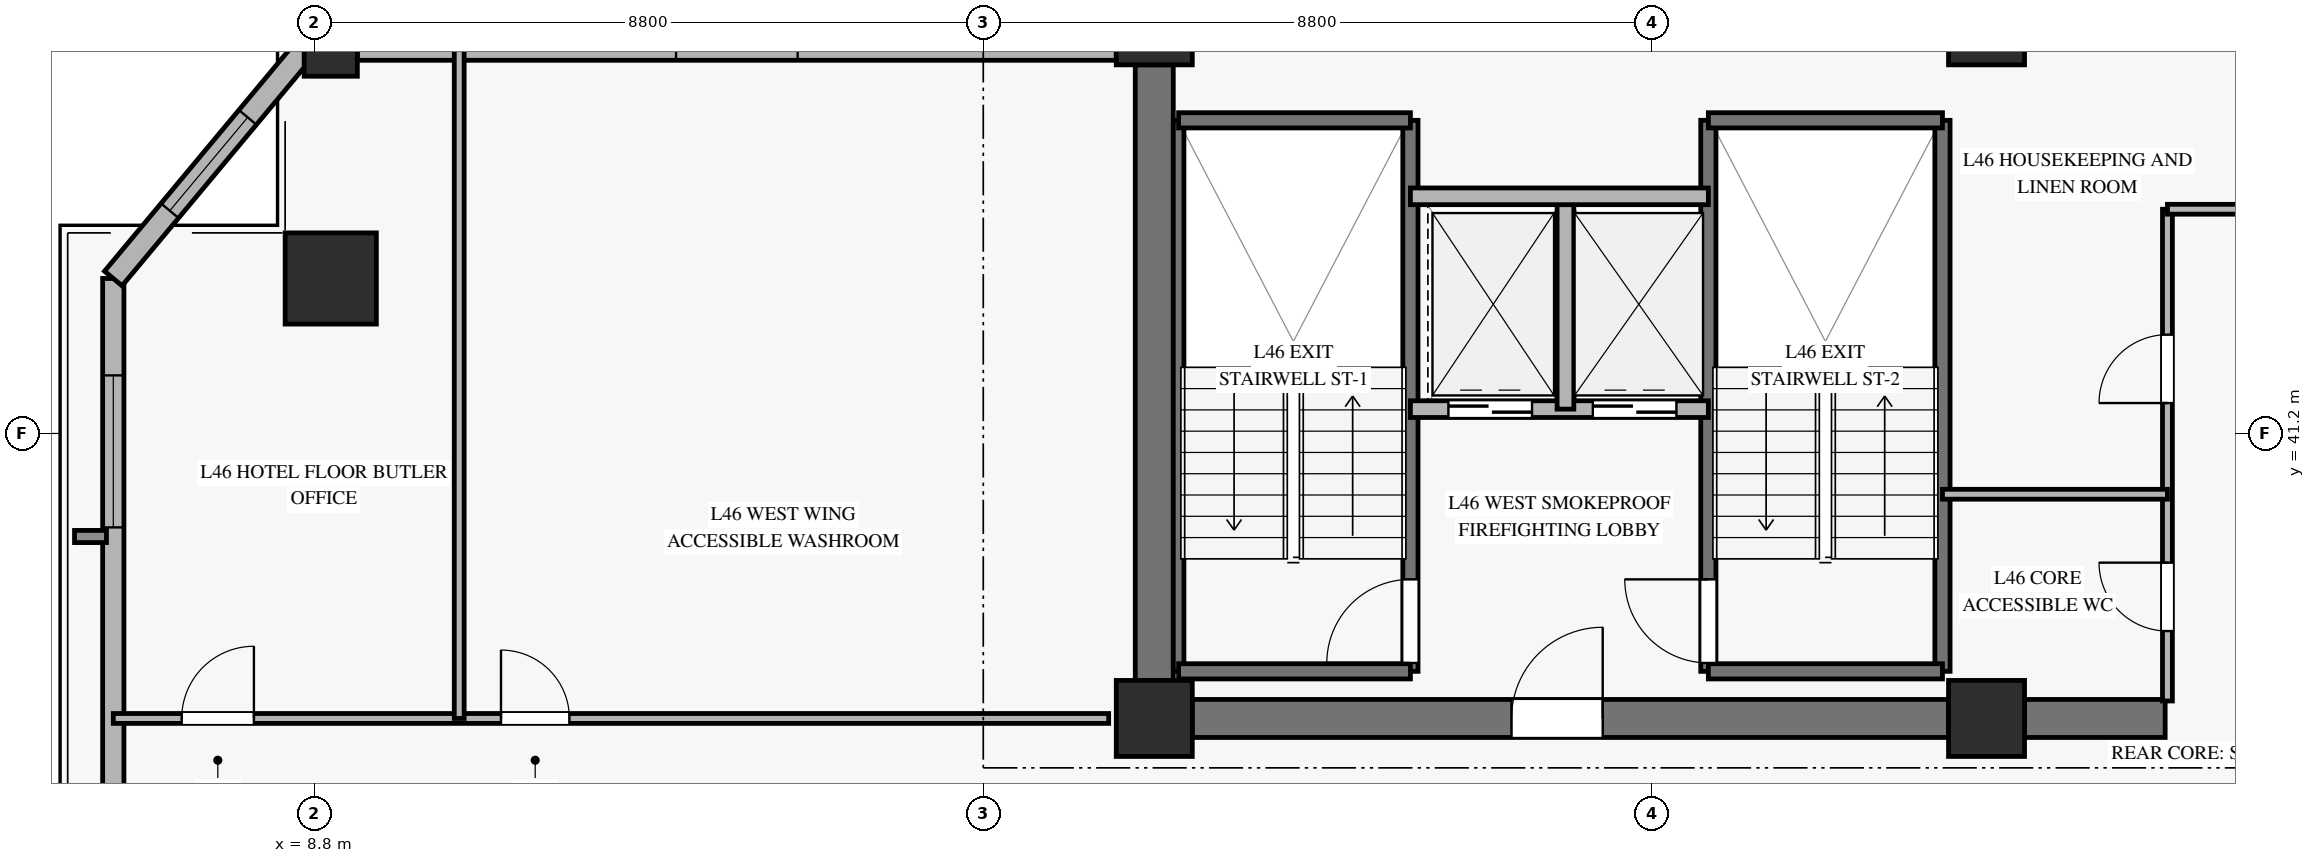
"""IFC4 building model, lengths in metres.
Left out: names, types, materials, properties, quantities, classifications, styles, units other than length and angle.
Written with IfcOpenShell. Run it as: python <this file> out.ifc"""

import sys

from ifc_helpers import new_model, si_unit, direction, frame, frame_2d, origin, origin_2d, place, context, subcontext, project, spatial, rectangle, hollow_rectangle, extrude, source, transform, mapped, element, fill, save


model = new_model("IFC4")
c1 = context("Model", 3, precision=1e-05, world=origin(), true_north=direction((0.0, 1.0)))
c2 = subcontext(c1, "Body", "Model", "MODEL_VIEW")
j1 = project(units=[si_unit("LENGTHUNIT", "METRE"), si_unit("PLANEANGLEUNIT", "RADIAN")], contexts=[c1])
p1 = place(None, origin())
s1 = spatial("IfcSite", under=j1, at=p1, CompositionType="ELEMENT")
p2 = place(p1, origin())
s2 = spatial("IfcBuilding", under=s1, at=p2, CompositionType="ELEMENT")
p3 = place(p2, frame((0.0, 0.0, 184.2)))
s3 = spatial("IfcBuildingStorey", under=s2, at=p3, CompositionType="ELEMENT", Elevation=184.2)
m1 = source(origin(), c2, "Body", "SweptSolid", [
    extrude(rectangle(XDim=1.0, YDim=1.0, at=origin_2d()), origin(), (0.0, 0.0, 1.0), 3.27),
])
for number, where, z_axis, x_axis in (
    (1, (19.85, 37.45, 0.0), (0.0, 0.0, 1.0), (1.0, 0.0, 0.0)),
    (2, (19.85, 46.55, 0.0), (0.0, 0.0, 1.0), (1.0, 0.0, 0.0)),
    (3, (30.8, 37.45, 0.0), (0.0, 0.0, 1.0), (1.0, 0.0, 0.0)),
    (4, (30.8, 46.55, 0.0), (0.0, 0.0, 1.0), (1.0, 0.0, 0.0)),
):
    element("IfcColumn", number, at=place(p3, frame(where, z_axis=z_axis, x_axis=x_axis)), inside=s3, PredefinedType="PILASTER", context=c2, shape_type="MappedRepresentation", body=[
        mapped(m1, transform((0.0, 0.0, 0.0), x_axis=(1.0, 0.0, 0.0), y_axis=(0.0, 1.0, 0.0), z_axis=(0.0, 0.0, 1.0), scale=1.0)),
    ])
p4 = place(p3, frame((20.35, 37.45, 0.0), z_axis=(0.0, 0.0, 1.0), x_axis=(1.0, 0.0, 0.0)))
e5 = element("IfcWall", 5, at=p4, inside=s3, PredefinedType="SHEAR", context=c2, shape_type="SweptSolid", body=[
    extrude(rectangle(XDim=9.95, YDim=0.5, at=frame_2d((4.975, 0.0))), origin(), (0.0, 0.0, 1.0), 3.27),
])
p5 = place(p4, frame((4.2, 0.0, 0.0)))
e6 = element("IfcOpeningElement", 6, at=p5, cuts=e5, PredefinedType="OPENING", context=c2, shape_type="SweptSolid", body=[
    extrude(rectangle(XDim=1.2, YDim=2.15, at=frame_2d((0.6, 1.075))), frame((0.0, 0.26, 0.0), z_axis=(0.0, -1.0, 0.0), x_axis=(1.0, 0.0, 0.0)), (0.0, 0.0, 1.0), 0.52),
])
p6 = place(p3, frame((31.3, 37.45, 0.0), z_axis=(0.0, 0.0, 1.0), x_axis=(1.0, 0.0, 0.0)))
e7 = element("IfcWall", 7, at=p6, inside=s3, PredefinedType="SHEAR", context=c2, shape_type="SweptSolid", body=[
    extrude(rectangle(XDim=1.85, YDim=0.5, at=frame_2d((0.925, 0.0))), origin(), (0.0, 0.0, 1.0), 3.27),
])
p7 = place(p3, frame((19.85, 37.95, 0.0), z_axis=(0.0, 0.0, 1.0), x_axis=(0.0, 1.0, 0.0)))
e8 = element("IfcWall", 8, at=p7, inside=s3, PredefinedType="SHEAR", context=c2, shape_type="SweptSolid", body=[
    extrude(rectangle(XDim=8.1, YDim=0.5, at=frame_2d((4.05, 0.0))), origin(), (0.0, 0.0, 1.0), 3.27),
])
m2 = source(origin(), c2, "Body", "SweptSolid", [
    extrude(hollow_rectangle(XDim=1.2, YDim=1.2, WallThickness=0.055, at=origin_2d()), origin(), (0.0, 0.0, 1.0), 3.27),
])
p8 = place(p3, frame((9.015, 43.239, 0.0), z_axis=(0.0, 0.0, 1.0), x_axis=(1.0, 0.0, 0.0)))
e9 = element("IfcColumn", 9, at=p8, inside=s3, PredefinedType="COLUMN", context=c2, shape_type="MappedRepresentation", body=[
    mapped(m2, transform((0.0, 0.0, 0.0), x_axis=(1.0, 0.0, 0.0), y_axis=(0.0, 1.0, 0.0), z_axis=(0.0, 0.0, 1.0), scale=1.0)),
])
m3 = source(origin(), c2, "Body", "SweptSolid", [
    extrude(hollow_rectangle(XDim=0.7, YDim=0.7, WallThickness=0.032, at=origin_2d()), origin(), (0.0, 0.0, 1.0), 3.27),
])
p9 = place(p3, frame((9.015, 46.25, 0.0), z_axis=(0.0, 0.0, 1.0), x_axis=(1.0, 0.0, 0.0)))
e10 = element("IfcColumn", 10, at=p9, inside=s3, PredefinedType="COLUMN", context=c2, shape_type="MappedRepresentation", body=[
    mapped(m3, transform((0.0, 0.0, 0.0), x_axis=(1.0, 0.0, 0.0), y_axis=(0.0, 1.0, 0.0), z_axis=(0.0, 0.0, 1.0), scale=1.0)),
])
p10 = place(p3, frame((6.154, 28.477, 0.0), z_axis=(0.0, 0.0, 1.0), x_axis=(0.0, 1.0, 0.0)))
e11 = element("IfcWall", 11, at=p10, inside=s3, PredefinedType="SOLIDWALL", context=c2, shape_type="SweptSolid", body=[
    extrude(rectangle(XDim=14.762, YDim=0.28, at=frame_2d((7.381, 0.0))), origin(), (0.0, 0.0, 1.0), 2.75),
])
p11 = place(p10, frame((1.232, 0.0, 0.45)))
e12 = element("IfcOpeningElement", 12, at=p11, cuts=e11, PredefinedType="OPENING", context=c2, shape_type="SweptSolid", body=[
    extrude(rectangle(XDim=2.0, YDim=2.0, at=frame_2d((1.0, 1.0))), frame((0.0, 0.15, 0.0), z_axis=(0.0, -1.0, 0.0), x_axis=(1.0, 0.0, 0.0)), (0.0, 0.0, 1.0), 0.3),
])
p12 = place(p10, frame((11.487, 0.0, 0.45)))
e13 = element("IfcOpeningElement", 13, at=p12, cuts=e11, PredefinedType="OPENING", context=c2, shape_type="SweptSolid", body=[
    extrude(rectangle(XDim=2.0, YDim=2.0, at=frame_2d((1.0, 1.0))), frame((0.0, 0.15, 0.0), z_axis=(0.0, -1.0, 0.0), x_axis=(1.0, 0.0, 0.0)), (0.0, 0.0, 1.0), 0.3),
])
p13 = place(p3, frame((9.365, 46.25, 0.0), z_axis=(0.0, 0.0, 1.0), x_axis=(1.0, 0.0, 0.0)))
e14 = element("IfcWall", 14, at=p13, inside=s3, PredefinedType="SOLIDWALL", context=c2, shape_type="SweptSolid", body=[
    extrude(rectangle(XDim=9.985, YDim=0.28, at=frame_2d((4.993, 0.0))), origin(), (0.0, 0.0, 1.0), 2.75),
])
p14 = place(p13, frame((4.193, 0.0, 0.45)))
e15 = element("IfcOpeningElement", 15, at=p14, cuts=e14, PredefinedType="OPENING", context=c2, shape_type="SweptSolid", body=[
    extrude(rectangle(XDim=1.6, YDim=2.0, at=frame_2d((0.8, 1.0))), frame((0.0, 0.15, 0.0), z_axis=(0.0, -1.0, 0.0), x_axis=(1.0, 0.0, 0.0)), (0.0, 0.0, 1.0), 0.3),
])
p15 = place(p3, frame((8.665, 46.25, 0.0), z_axis=(0.0, 0.0, 1.0), x_axis=(-0.640459985381, -0.767991541051, 0.0)))
e16 = element("IfcWall", 16, at=p15, inside=s3, PredefinedType="SOLIDWALL", context=c2, shape_type="SweptSolid", body=[
    extrude(rectangle(XDim=3.921, YDim=0.3, at=frame_2d((1.96, 0.0))), origin(), (0.0, 0.0, 1.0), 2.75),
])
p16 = place(p15, frame((1.16, 0.0, 0.45)))
e17 = element("IfcOpeningElement", 17, at=p16, cuts=e16, PredefinedType="OPENING", context=c2, shape_type="SweptSolid", body=[
    extrude(rectangle(XDim=1.6, YDim=2.0, at=frame_2d((0.8, 1.0))), frame((0.0, 0.16, 0.0), z_axis=(0.0, -1.0, 0.0), x_axis=(1.0, 0.0, 0.0)), (0.0, 0.0, 1.0), 0.32),
])
p17 = place(p3, frame((20.17, 38.07, 0.0), z_axis=(0.0, 0.0, 1.0), x_axis=(0.0, 1.0, 0.0)))
e18 = element("IfcWall", 18, at=p17, inside=s3, PredefinedType="SOLIDWALL", context=c2, shape_type="SweptSolid", body=[
    extrude(rectangle(XDim=7.25, YDim=0.14, at=frame_2d((3.625, 0.0))), origin(), (0.0, 0.0, 1.0), 3.5),
])
p18 = place(p3, frame((23.22, 38.07, 0.0), z_axis=(0.0, 0.0, 1.0), x_axis=(0.0, 1.0, 0.0)))
e19 = element("IfcWall", 19, at=p18, inside=s3, PredefinedType="SOLIDWALL", context=c2, shape_type="SweptSolid", body=[
    extrude(rectangle(XDim=7.25, YDim=0.2, at=frame_2d((3.625, 0.0))), origin(), (0.0, 0.0, 1.0), 3.5),
])
p19 = place(p18, frame((0.11, 0.0, 0.0)))
e20 = element("IfcOpeningElement", 20, at=p19, cuts=e19, PredefinedType="OPENING", context=c2, shape_type="SweptSolid", body=[
    extrude(rectangle(XDim=1.1, YDim=2.15, at=frame_2d((0.55, 1.075))), frame((0.0, 0.11, 0.0), z_axis=(0.0, -1.0, 0.0), x_axis=(1.0, 0.0, 0.0)), (0.0, 0.0, 1.0), 0.22),
])
for number, where, z_axis, x_axis in (
    (21, (20.17, 45.32, 0.0), (0.0, 0.0, 1.0), (1.0, 0.0, 0.0)),
    (22, (20.17, 38.07, 0.0), (0.0, 0.0, 1.0), (1.0, 0.0, 0.0)),
):
    element("IfcWall", number, at=place(p3, frame(where, z_axis=z_axis, x_axis=x_axis)), inside=s3, PredefinedType="SOLIDWALL", context=c2, shape_type="SweptSolid", body=[
        extrude(rectangle(XDim=3.05, YDim=0.2, at=frame_2d((1.525, 0.0))), origin(), (0.0, 0.0, 1.0), 3.5),
    ])
p20 = place(p3, frame((27.14, 38.07, 0.0), z_axis=(0.0, 0.0, 1.0), x_axis=(0.0, 1.0, 0.0)))
e23 = element("IfcWall", 23, at=p20, inside=s3, PredefinedType="SOLIDWALL", context=c2, shape_type="SweptSolid", body=[
    extrude(rectangle(XDim=7.25, YDim=0.2, at=frame_2d((3.625, 0.0))), origin(), (0.0, 0.0, 1.0), 3.5),
])
p21 = place(p20, frame((0.11, 0.0, 0.0)))
e24 = element("IfcOpeningElement", 24, at=p21, cuts=e23, PredefinedType="OPENING", context=c2, shape_type="SweptSolid", body=[
    extrude(rectangle(XDim=1.1, YDim=2.15, at=frame_2d((0.55, 1.075))), frame((0.0, 0.11, 0.0), z_axis=(0.0, -1.0, 0.0), x_axis=(1.0, 0.0, 0.0)), (0.0, 0.0, 1.0), 0.22),
])
p22 = place(p3, frame((30.22, 38.07, 0.0), z_axis=(0.0, 0.0, 1.0), x_axis=(0.0, 1.0, 0.0)))
e25 = element("IfcWall", 25, at=p22, inside=s3, PredefinedType="SOLIDWALL", context=c2, shape_type="SweptSolid", body=[
    extrude(rectangle(XDim=7.25, YDim=0.2, at=frame_2d((3.625, 0.0))), origin(), (0.0, 0.0, 1.0), 3.5),
])
for number, where, z_axis, x_axis in (
    (26, (27.14, 45.32, 0.0), (0.0, 0.0, 1.0), (1.0, 0.0, 0.0)),
    (27, (27.14, 38.07, 0.0), (0.0, 0.0, 1.0), (1.0, 0.0, 0.0)),
):
    element("IfcWall", number, at=place(p3, frame(where, z_axis=z_axis, x_axis=x_axis)), inside=s3, PredefinedType="SOLIDWALL", context=c2, shape_type="SweptSolid", body=[
        extrude(rectangle(XDim=3.08, YDim=0.2, at=frame_2d((1.54, 0.0))), origin(), (0.0, 0.0, 1.0), 3.5),
    ])
p23 = place(p3, frame((23.22, 41.52, 0.0), z_axis=(0.0, 0.0, 1.0), x_axis=(1.0, 0.0, 0.0)))
e28 = element("IfcWall", 28, at=p23, inside=s3, PredefinedType="SOLIDWALL", context=c2, shape_type="SweptSolid", body=[
    extrude(rectangle(XDim=3.92, YDim=0.22, at=frame_2d((1.96, 0.0))), origin(), (0.0, 0.0, 1.0), 3.27),
])
p24 = place(p23, frame((0.5, 0.0, 0.0)))
e29 = element("IfcOpeningElement", 29, at=p24, cuts=e28, PredefinedType="OPENING", context=c2, shape_type="SweptSolid", body=[
    extrude(rectangle(XDim=1.1, YDim=2.2, at=frame_2d((0.55, 1.1))), frame((0.0, 0.12, 0.0), z_axis=(0.0, -1.0, 0.0), x_axis=(1.0, 0.0, 0.0)), (0.0, 0.0, 1.0), 0.24),
])
p25 = place(p23, frame((2.4, 0.0, 0.0)))
e30 = element("IfcOpeningElement", 30, at=p25, cuts=e28, PredefinedType="OPENING", context=c2, shape_type="SweptSolid", body=[
    extrude(rectangle(XDim=1.1, YDim=2.2, at=frame_2d((0.55, 1.1))), frame((0.0, 0.12, 0.0), z_axis=(0.0, -1.0, 0.0), x_axis=(1.0, 0.0, 0.0)), (0.0, 0.0, 1.0), 0.24),
])
p26 = place(p3, frame((25.26, 41.52, 0.0), z_axis=(0.0, 0.0, 1.0), x_axis=(0.0, 1.0, 0.0)))
e31 = element("IfcWall", 31, at=p26, inside=s3, PredefinedType="SOLIDWALL", context=c2, shape_type="SweptSolid", body=[
    extrude(rectangle(XDim=2.8, YDim=0.22, at=frame_2d((1.4, 0.0))), origin(), (0.0, 0.0, 1.0), 3.27),
])
p27 = place(p3, frame((23.22, 44.32, 0.0), z_axis=(0.0, 0.0, 1.0), x_axis=(1.0, 0.0, 0.0)))
e32 = element("IfcWall", 32, at=p27, inside=s3, PredefinedType="SOLIDWALL", context=c2, shape_type="SweptSolid", body=[
    extrude(rectangle(XDim=3.92, YDim=0.22, at=frame_2d((1.96, 0.0))), origin(), (0.0, 0.0, 1.0), 3.27),
])
p28 = place(p3, frame((33.18, 37.68, 0.0), z_axis=(0.0, 0.0, 1.0), x_axis=(0.0, 1.0, 0.0)))
e33 = element("IfcWall", 33, at=p28, inside=s3, PredefinedType="PARTITIONING", context=c2, shape_type="SweptSolid", body=[
    extrude(rectangle(XDim=6.47, YDim=0.13, at=frame_2d((3.235, 0.0))), origin(), (0.0, 0.0, 1.0), 2.355),
])
p29 = place(p28, frame((0.92, 0.0, 0.0)))
e34 = element("IfcOpeningElement", 34, at=p29, cuts=e33, PredefinedType="OPENING", context=c2, shape_type="SweptSolid", body=[
    extrude(rectangle(XDim=0.9, YDim=2.1, at=frame_2d((0.45, 1.05))), frame((0.0, 0.075, 0.0), z_axis=(0.0, -1.0, 0.0), x_axis=(1.0, 0.0, 0.0)), (0.0, 0.0, 1.0), 0.15),
])
p30 = place(p28, frame((3.92, 0.0, 0.0)))
e35 = element("IfcOpeningElement", 35, at=p30, cuts=e33, PredefinedType="OPENING", context=c2, shape_type="SweptSolid", body=[
    extrude(rectangle(XDim=0.9, YDim=2.1, at=frame_2d((0.45, 1.05))), frame((0.0, 0.075, 0.0), z_axis=(0.0, -1.0, 0.0), x_axis=(1.0, 0.0, 0.0)), (0.0, 0.0, 1.0), 0.15),
])
p31 = place(p3, frame((33.18, 44.15, 0.0), z_axis=(0.0, 0.0, 1.0), x_axis=(1.0, 0.0, 0.0)))
e36 = element("IfcWall", 36, at=p31, inside=s3, PredefinedType="PARTITIONING", context=c2, shape_type="SweptSolid", body=[
    extrude(rectangle(XDim=2.97, YDim=0.13, at=frame_2d((1.485, 0.0))), origin(), (0.0, 0.0, 1.0), 2.555),
])
p32 = place(p3, frame((30.22, 40.4, 0.0), z_axis=(0.0, 0.0, 1.0), x_axis=(1.0, 0.0, 0.0)))
e37 = element("IfcWall", 37, at=p32, inside=s3, PredefinedType="PARTITIONING", context=c2, shape_type="SweptSolid", body=[
    extrude(rectangle(XDim=2.96, YDim=0.13, at=frame_2d((1.48, 0.0))), origin(), (0.0, 0.0, 1.0), 2.555),
])
p33 = place(p3, frame((6.154, 37.45, 0.0), z_axis=(0.0, 0.0, 1.0), x_axis=(1.0, 0.0, 0.0)))
e38 = element("IfcWall", 38, at=p33, inside=s3, PredefinedType="PARTITIONING", context=c2, shape_type="SweptSolid", body=[
    extrude(rectangle(XDim=13.096, YDim=0.13, at=frame_2d((6.548, 0.0))), origin(), (0.0, 0.0, 1.0), 2.755),
])
p34 = place(p33, frame((0.9, 0.0, 0.0)))
e39 = element("IfcOpeningElement", 39, at=p34, cuts=e38, PredefinedType="OPENING", context=c2, shape_type="SweptSolid", body=[
    extrude(rectangle(XDim=0.95, YDim=2.1, at=frame_2d((0.475, 1.05))), frame((0.0, 0.075, 0.0), z_axis=(0.0, -1.0, 0.0), x_axis=(1.0, 0.0, 0.0)), (0.0, 0.0, 1.0), 0.15),
])
p35 = place(p33, frame((5.101, 0.0, 0.0)))
e40 = element("IfcOpeningElement", 40, at=p35, cuts=e38, PredefinedType="OPENING", context=c2, shape_type="SweptSolid", body=[
    extrude(rectangle(XDim=0.9, YDim=2.1, at=frame_2d((0.45, 1.05))), frame((0.0, 0.075, 0.0), z_axis=(0.0, -1.0, 0.0), x_axis=(1.0, 0.0, 0.0)), (0.0, 0.0, 1.0), 0.15),
])
p36 = place(p3, frame((10.705, 37.45, 0.0), z_axis=(0.0, 0.0, 1.0), x_axis=(0.0, 1.0, 0.0)))
e41 = element("IfcWall", 41, at=p36, inside=s3, PredefinedType="PARTITIONING", context=c2, shape_type="SweptSolid", body=[
    extrude(rectangle(XDim=8.8, YDim=0.13, at=frame_2d((4.4, 0.0))), origin(), (0.0, 0.0, 1.0), 3.27),
])
m4 = source(origin(), c2, "Body", "SweptSolid", [
    extrude(rectangle(XDim=2.0, YDim=2.0, at=frame_2d((1.0, 1.0))), frame((0.0, 0.03, 0.0), z_axis=(0.0, -1.0, 0.0), x_axis=(1.0, 0.0, 0.0)), (0.0, 0.0, 1.0), 0.06),
])
p37 = place(p12, origin())
e42 = element("IfcWindow", 42, at=p37, inside=s3, PartitioningType="SINGLE_PANEL", PredefinedType="WINDOW", context=c2, shape_type="MappedRepresentation", body=[
    mapped(m4, transform((0.0, 0.0, 0.0), x_axis=(1.0, 0.0, 0.0), y_axis=(0.0, 1.0, 0.0), z_axis=(0.0, 0.0, 1.0), scale=1.0)),
])
fill(e13, e42)
m5 = source(origin(), c2, "Body", "SweptSolid", [
    extrude(rectangle(XDim=1.6, YDim=2.0, at=frame_2d((0.8, 1.0))), frame((0.0, 0.03, 0.0), z_axis=(0.0, -1.0, 0.0), x_axis=(1.0, 0.0, 0.0)), (0.0, 0.0, 1.0), 0.06),
])
p38 = place(p16, origin())
e43 = element("IfcWindow", 43, at=p38, inside=s3, PartitioningType="SINGLE_PANEL", PredefinedType="WINDOW", context=c2, shape_type="MappedRepresentation", body=[
    mapped(m5, transform((0.0, 0.0, 0.0), x_axis=(1.0, 0.0, 0.0), y_axis=(0.0, 1.0, 0.0), z_axis=(0.0, 0.0, 1.0), scale=1.0)),
])
fill(e17, e43)
m6 = source(origin(), c2, "Body", "SweptSolid", [
    extrude(rectangle(XDim=1.1, YDim=2.15, at=frame_2d((0.55, 1.075))), frame((0.0, 0.025, 0.0), z_axis=(0.0, -1.0, 0.0), x_axis=(1.0, 0.0, 0.0)), (0.0, 0.0, 1.0), 0.05),
])
p39 = place(p19, origin())
e44 = element("IfcDoor", 44, at=p39, inside=s3, OperationType="SINGLE_SWING_LEFT", PredefinedType="DOOR", context=c2, shape_type="MappedRepresentation", body=[
    mapped(m6, transform((0.0, 0.0, 0.0), x_axis=(1.0, 0.0, 0.0), y_axis=(0.0, 1.0, 0.0), z_axis=(0.0, 0.0, 1.0), scale=1.0)),
])
fill(e20, e44)
p40 = place(p21, origin())
e45 = element("IfcDoor", 45, at=p40, inside=s3, OperationType="SINGLE_SWING_RIGHT", PredefinedType="DOOR", context=c2, shape_type="MappedRepresentation", body=[
    mapped(m6, transform((0.0, 0.0, 0.0), x_axis=(1.0, 0.0, 0.0), y_axis=(0.0, 1.0, 0.0), z_axis=(0.0, 0.0, 1.0), scale=1.0)),
])
fill(e24, e45)
m7 = source(origin(), c2, "Body", "SweptSolid", [
    extrude(rectangle(XDim=1.1, YDim=2.2, at=frame_2d((0.55, 1.1))), frame((0.0, 0.025, 0.0), z_axis=(0.0, -1.0, 0.0), x_axis=(1.0, 0.0, 0.0)), (0.0, 0.0, 1.0), 0.05),
])
p41 = place(p24, origin())
e46 = element("IfcDoor", 46, at=p41, inside=s3, OperationType="SLIDING_TO_LEFT", PredefinedType="DOOR", context=c2, shape_type="MappedRepresentation", body=[
    mapped(m7, transform((0.0, 0.0, 0.0), x_axis=(1.0, 0.0, 0.0), y_axis=(0.0, 1.0, 0.0), z_axis=(0.0, 0.0, 1.0), scale=1.0)),
])
fill(e29, e46)
p42 = place(p25, origin())
e47 = element("IfcDoor", 47, at=p42, inside=s3, OperationType="SLIDING_TO_LEFT", PredefinedType="DOOR", context=c2, shape_type="MappedRepresentation", body=[
    mapped(m7, transform((0.0, 0.0, 0.0), x_axis=(1.0, 0.0, 0.0), y_axis=(0.0, 1.0, 0.0), z_axis=(0.0, 0.0, 1.0), scale=1.0)),
])
fill(e30, e47)
m8 = source(origin(), c2, "Body", "SweptSolid", [
    extrude(rectangle(XDim=1.2, YDim=2.15, at=frame_2d((0.6, 1.075))), frame((0.0, 0.025, 0.0), z_axis=(0.0, -1.0, 0.0), x_axis=(1.0, 0.0, 0.0)), (0.0, 0.0, 1.0), 0.05),
])
p43 = place(p5, origin())
e48 = element("IfcDoor", 48, at=p43, inside=s3, OperationType="SINGLE_SWING_RIGHT", PredefinedType="DOOR", context=c2, shape_type="MappedRepresentation", body=[
    mapped(m8, transform((0.0, 0.0, 0.0), x_axis=(1.0, 0.0, 0.0), y_axis=(0.0, 1.0, 0.0), z_axis=(0.0, 0.0, 1.0), scale=1.0)),
])
fill(e6, e48)
m9 = source(origin(), c2, "Body", "SweptSolid", [
    extrude(rectangle(XDim=0.9, YDim=2.1, at=frame_2d((0.45, 1.05))), frame((0.0, 0.025, 0.0), z_axis=(0.0, -1.0, 0.0), x_axis=(1.0, 0.0, 0.0)), (0.0, 0.0, 1.0), 0.05),
])
p44 = place(p29, origin())
e49 = element("IfcDoor", 49, at=p44, inside=s3, OperationType="SINGLE_SWING_RIGHT", PredefinedType="DOOR", context=c2, shape_type="MappedRepresentation", body=[
    mapped(m9, transform((0.0, 0.0, 0.0), x_axis=(1.0, 0.0, 0.0), y_axis=(0.0, 1.0, 0.0), z_axis=(0.0, 0.0, 1.0), scale=1.0)),
])
fill(e34, e49)
p45 = place(p30, origin())
e50 = element("IfcDoor", 50, at=p45, inside=s3, OperationType="SINGLE_SWING_LEFT", PredefinedType="DOOR", context=c2, shape_type="MappedRepresentation", body=[
    mapped(m9, transform((0.0, 0.0, 0.0), x_axis=(1.0, 0.0, 0.0), y_axis=(0.0, 1.0, 0.0), z_axis=(0.0, 0.0, 1.0), scale=1.0)),
])
fill(e35, e50)
m10 = source(origin(), c2, "Body", "SweptSolid", [
    extrude(rectangle(XDim=0.95, YDim=2.1, at=frame_2d((0.475, 1.05))), frame((0.0, 0.025, 0.0), z_axis=(0.0, -1.0, 0.0), x_axis=(1.0, 0.0, 0.0)), (0.0, 0.0, 1.0), 0.05),
])
p46 = place(p34, origin())
e51 = element("IfcDoor", 51, at=p46, inside=s3, OperationType="SINGLE_SWING_RIGHT", PredefinedType="DOOR", context=c2, shape_type="MappedRepresentation", body=[
    mapped(m10, transform((0.0, 0.0, 0.0), x_axis=(1.0, 0.0, 0.0), y_axis=(0.0, 1.0, 0.0), z_axis=(0.0, 0.0, 1.0), scale=1.0)),
])
fill(e39, e51)
p47 = place(p35, origin())
e52 = element("IfcDoor", 52, at=p47, inside=s3, OperationType="SINGLE_SWING_LEFT", PredefinedType="DOOR", context=c2, shape_type="MappedRepresentation", body=[
    mapped(m9, transform((0.0, 0.0, 0.0), x_axis=(1.0, 0.0, 0.0), y_axis=(0.0, 1.0, 0.0), z_axis=(0.0, 0.0, 1.0), scale=1.0)),
])
fill(e40, e52)
save(model, sys.argv[1])
